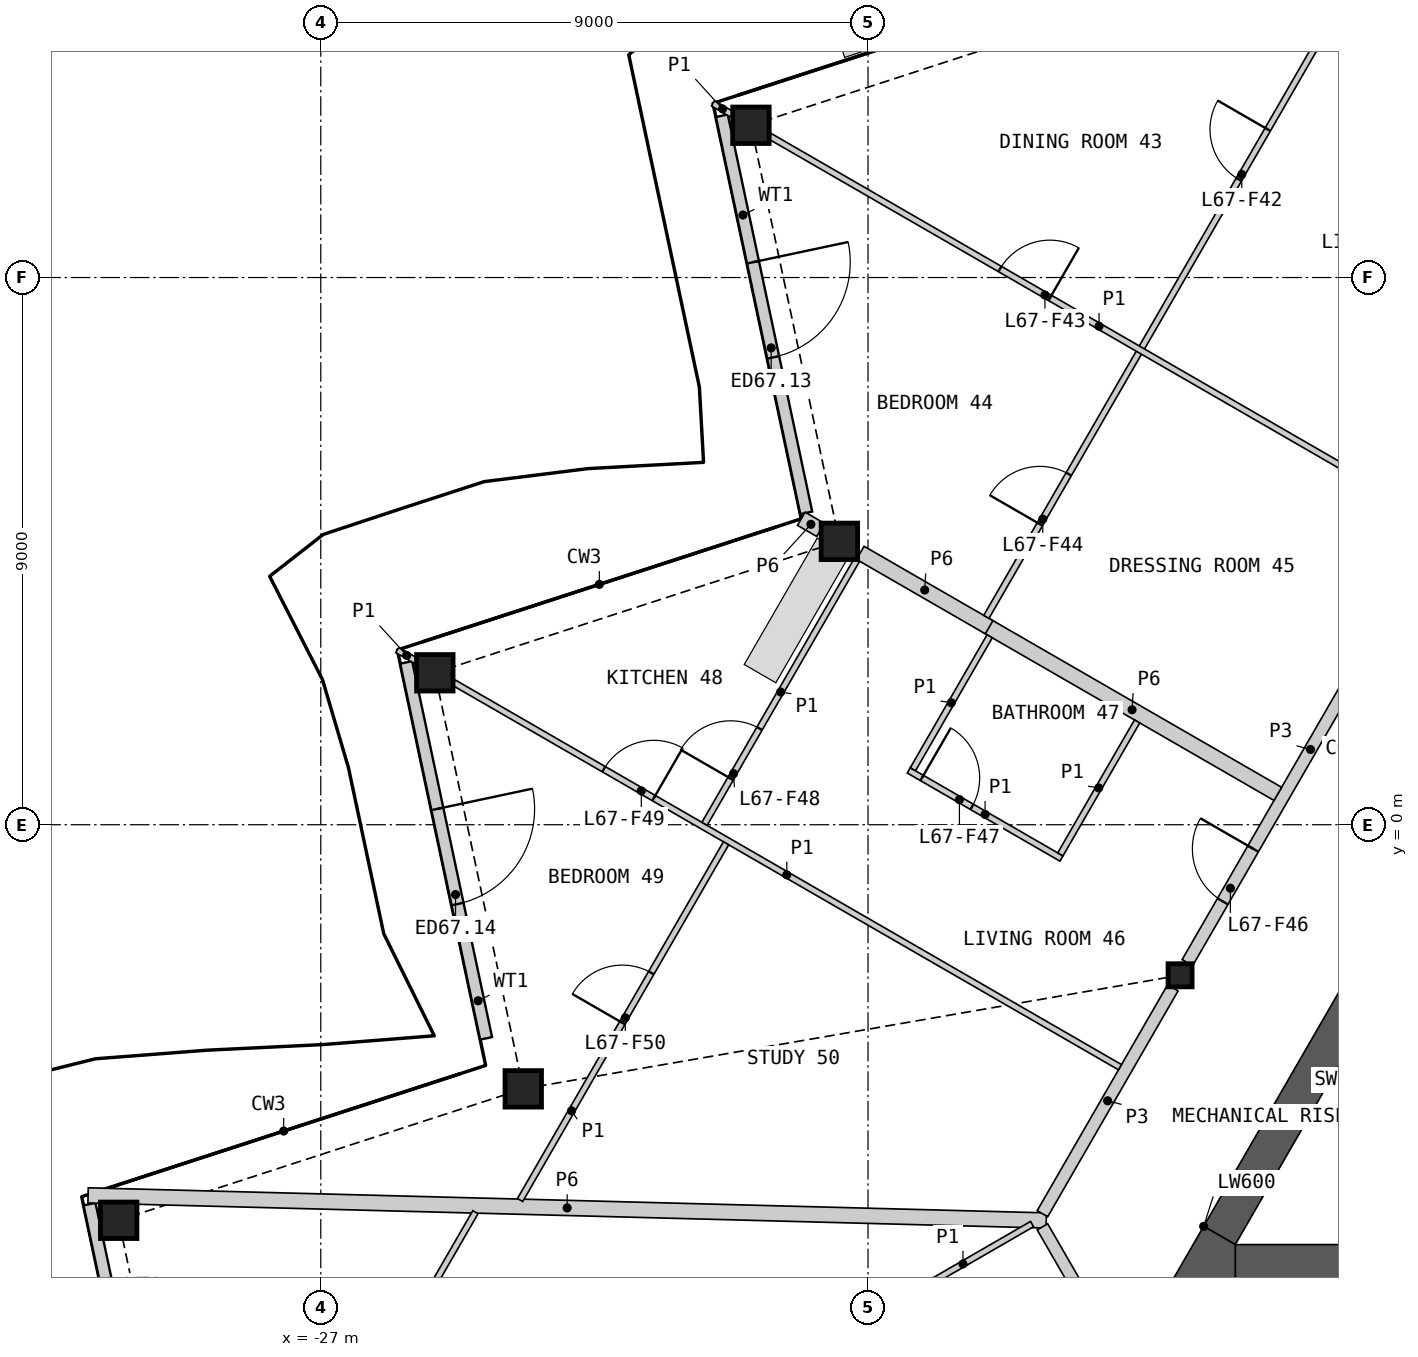
"""IFC4 building model, lengths in metres.
Left out: names, types, materials, properties, quantities, classifications, styles, units other than length and angle.
Written with IfcOpenShell. Run it as: python <this file> out.ifc"""

import sys

from ifc_helpers import new_model, si_unit, direction, frame, frame_2d, origin, origin_2d, place, context, subcontext, project, spatial, polyline, rectangle, hollow_rectangle, i_section, outline, extrude, element, fill, save


model = new_model("IFC4")
c1 = context("Model", 3, precision=1e-05, world=origin(), true_north=direction((0.0, 1.0)))
c2 = subcontext(c1, "Body", "Model", "MODEL_VIEW")
j1 = project(units=[si_unit("LENGTHUNIT", "METRE"), si_unit("PLANEANGLEUNIT", "RADIAN")], contexts=[c1])
p1 = place(None, origin())
s1 = spatial("IfcSite", under=j1, at=p1, CompositionType="ELEMENT")
p2 = place(p1, origin())
s2 = spatial("IfcBuilding", under=s1, at=p2, CompositionType="ELEMENT")
p3 = place(p2, frame((0.0, 0.0, 308.6)))
s3 = spatial("IfcBuildingStorey", under=s2, at=p3, CompositionType="ELEMENT", Elevation=308.6)
for number, where, z_axis, x_axis in (
    (1, (-19.926, 11.504, 0.0), (0.0, 0.0, 1.0), (1.0, 0.0, 0.0)),
    (2, (-18.471, 4.661, 0.0), (0.0, 0.0, 1.0), (1.0, 0.0, 0.0)),
    (3, (-25.125, 2.499, 0.0), (0.0, 0.0, 1.0), (1.0, 0.0, 0.0)),
    (4, (-23.67, -4.344, 0.0), (0.0, 0.0, 1.0), (1.0, 0.0, 0.0)),
    (5, (-30.324, -6.506, 0.0), (0.0, 0.0, 1.0), (1.0, 0.0, 0.0)),
):
    element("IfcColumn", number, at=place(p3, frame(where, z_axis=z_axis, x_axis=x_axis)), inside=s3, PredefinedType="COLUMN", context=c2, shape_type="SweptSolid", body=[
        extrude(hollow_rectangle(XDim=0.6, YDim=0.6, WallThickness=0.04, at=origin_2d()), origin(), (0.0, 0.0, 1.0), 3.4),
    ])
p4 = place(p3, frame((-12.868, -2.476, 0.0), z_axis=(0.0, 0.0, 1.0), x_axis=(1.0, 0.0, 0.0)))
e6 = element("IfcColumn", 6, at=p4, inside=s3, PredefinedType="COLUMN", context=c2, shape_type="SweptSolid", body=[
    extrude(i_section(OverallWidth=0.396, OverallDepth=0.381, WebThickness=0.019, FlangeThickness=0.03, at=origin_2d()), origin(), (0.0, 0.0, 1.0), 3.4),
])
p5 = place(p3, frame((-20.404, 11.661, 0.0), z_axis=(0.0, 0.0, 1.0), x_axis=(0.207893301034, -0.978151509422, 0.0)))
e7 = element("IfcWall", 7, at=p5, inside=s3, PredefinedType="SOLIDWALL", context=c2, shape_type="SweptSolid", body=[
    extrude(rectangle(XDim=6.677, YDim=0.2, at=frame_2d((3.339, 0.0))), origin(), (0.0, 0.0, 1.0), 2.488),
])
p6 = place(p5, frame((2.463, 0.0, 0.0)))
e8 = element("IfcOpeningElement", 8, at=p6, cuts=e7, PredefinedType="OPENING", context=c2, shape_type="SweptSolid", body=[
    extrude(rectangle(XDim=1.6, YDim=2.25, at=frame_2d((0.8, 1.125))), frame((0.0, 0.11, 0.0), z_axis=(0.0, -1.0, 0.0), x_axis=(1.0, 0.0, 0.0)), (0.0, 0.0, 1.0), 0.22),
])
p7 = place(p3, frame((-25.595, 2.67, 0.0), z_axis=(0.0, 0.0, 1.0), x_axis=(0.207888316408, -0.978152568826, 0.0)))
e9 = element("IfcWall", 9, at=p7, inside=s3, PredefinedType="SOLIDWALL", context=c2, shape_type="SweptSolid", body=[
    extrude(rectangle(XDim=6.322, YDim=0.2, at=frame_2d((3.161, 0.0))), origin(), (0.0, 0.0, 1.0), 2.488),
])
p8 = place(p7, frame((2.463, 0.0, 0.0)))
e10 = element("IfcOpeningElement", 10, at=p8, cuts=e9, PredefinedType="OPENING", context=c2, shape_type="SweptSolid", body=[
    extrude(rectangle(XDim=1.6, YDim=2.25, at=frame_2d((0.8, 1.125))), frame((0.0, 0.11, 0.0), z_axis=(0.0, -1.0, 0.0), x_axis=(1.0, 0.0, 0.0)), (0.0, 0.0, 1.0), 0.22),
])
p9 = place(p3, frame((-30.803, -6.241, 0.0), z_axis=(0.0, 0.0, 1.0), x_axis=(0.207917941651, -0.978146272057, 0.0)))
e11 = element("IfcWall", 11, at=p9, inside=s3, PredefinedType="SOLIDWALL", context=c2, shape_type="SweptSolid", body=[
    extrude(rectangle(XDim=6.759, YDim=0.2, at=frame_2d((3.379, 0.0))), origin(), (0.0, 0.0, 1.0), 2.488),
])
p10 = place(p9, frame((2.545, 0.0, 0.0)))
e12 = element("IfcOpeningElement", 12, at=p10, cuts=e11, PredefinedType="OPENING", context=c2, shape_type="SweptSolid", body=[
    extrude(rectangle(XDim=1.6, YDim=2.25, at=frame_2d((0.8, 1.125))), frame((0.0, 0.11, 0.0), z_axis=(0.0, -1.0, 0.0), x_axis=(1.0, 0.0, 0.0)), (0.0, 0.0, 1.0), 0.22),
])
p11 = place(p3, origin())
e13 = element("IfcWall", 13, at=p11, inside=s3, PredefinedType="SHEAR", context=c2, shape_type="SweptSolid", body=[
    extrude(outline(polyline([(-5.307, -1.281), (-10.374, -4.206), (-10.032, -4.298), (-5.182, -1.498), (-5.307, -1.281)])), origin(), (0.0, 0.0, 1.0), 3.1),
])
p12 = place(p3, origin())
e14 = element("IfcWall", 14, at=p12, inside=s3, PredefinedType="SHEAR", context=c2, shape_type="SweptSolid", body=[
    extrude(outline(polyline([(-10.374, -4.206), (-8.83, -6.881), (-8.738, -6.539), (-10.032, -4.298), (-10.374, -4.206)])), origin(), (0.0, 0.0, 1.0), 3.1),
])
p13 = place(p3, frame((-11.961, -7.206, 0.0), z_axis=(0.0, 0.0, 1.0), x_axis=(1.0, 0.0, 0.0)))
e15 = element("IfcWall", 15, at=p13, inside=s3, PredefinedType="SHEAR", context=c2, shape_type="SweptSolid", body=[
    extrude(rectangle(XDim=4.868, YDim=0.6, at=frame_2d((2.434, 0.0))), origin(), (0.0, 0.0, 1.0), 3.1),
])
p14 = place(p3, frame((-9.562, -2.15, 0.0), z_axis=(0.0, 0.0, 1.0), x_axis=(-0.500015214976, -0.866016619236, 0.0)))
e16 = element("IfcWall", 16, at=p14, inside=s3, PredefinedType="SHEAR", context=c2, shape_type="SweptSolid", body=[
    extrude(rectangle(XDim=5.318, YDim=0.6, at=frame_2d((2.659, 0.0))), origin(), (0.0, 0.0, 1.0), 3.1),
])
p15 = place(p3, origin())
e17 = element("IfcWall", 17, at=p15, inside=s3, PredefinedType="SHEAR", context=c2, shape_type="SweptSolid", body=[
    extrude(outline(polyline([(-12.48, -6.606), (-11.961, -6.906), (-11.961, -7.506), (-13.0, -7.506), (-12.48, -6.606)])), origin(), (0.0, 0.0, 1.0), 3.1),
])
p16 = place(p3, frame((-30.827, -6.096, 0.0), z_axis=(0.0, 0.0, 1.0), x_axis=(0.999657799118, -0.026158835273, 0.0)))
e18 = element("IfcWall", 18, at=p16, inside=s3, PredefinedType="PARTITIONING", context=c2, shape_type="SweptSolid", body=[
    extrude(rectangle(XDim=15.763, YDim=0.25, at=frame_2d((7.882, 0.0))), origin(), (0.0, 0.0, 1.0), 2.33),
])
p17 = place(p3, frame((-12.748, -2.269, 0.0), z_axis=(0.0, 0.0, 1.0), x_axis=(0.499984266882, 0.866034487114, 0.0)))
e19 = element("IfcWall", 19, at=p17, inside=s3, PredefinedType="PARTITIONING", context=c2, shape_type="SweptSolid", body=[
    extrude(rectangle(XDim=8.099, YDim=0.2, at=frame_2d((4.049, 0.0))), origin(), (0.0, 0.0, 1.0), 3.1),
])
p18 = place(p17, frame((1.164, 0.0, 0.0)))
e20 = element("IfcOpeningElement", 20, at=p18, cuts=e19, PredefinedType="OPENING", context=c2, shape_type="SweptSolid", body=[
    extrude(rectangle(XDim=1.0, YDim=2.1, at=frame_2d((0.5, 1.05))), frame((0.0, 0.11, 0.0), z_axis=(0.0, -1.0, 0.0), x_axis=(1.0, 0.0, 0.0)), (0.0, 0.0, 1.0), 0.22),
])
p19 = place(p3, frame((-16.054, 3.275, 0.0), z_axis=(0.0, 0.0, 1.0), x_axis=(0.866019581949, -0.500010083578, 0.0)))
e21 = element("IfcWall", 21, at=p19, inside=s3, PredefinedType="PARTITIONING", context=c2, shape_type="SweptSolid", body=[
    extrude(rectangle(XDim=5.535, YDim=0.25, at=frame_2d((2.768, 0.0))), origin(), (0.0, 0.0, 1.0), 2.33),
])
p20 = place(p3, frame((-15.131, -6.397, 0.0), z_axis=(0.0, 0.0, 1.0), x_axis=(0.500003406062, 0.866023437285, 0.0)))
e22 = element("IfcWall", 22, at=p20, inside=s3, PredefinedType="PARTITIONING", context=c2, shape_type="SweptSolid", body=[
    extrude(rectangle(XDim=4.288, YDim=0.2, at=frame_2d((2.144, 0.0))), origin(), (0.0, 0.0, 1.0), 3.1),
])
p21 = place(p3, frame((-15.131, -6.614, 0.0), z_axis=(0.0, 0.0, 1.0), x_axis=(0.499967746641, -0.866044024469, 0.0)))
e23 = element("IfcWall", 23, at=p21, inside=s3, PredefinedType="PARTITIONING", context=c2, shape_type="SweptSolid", body=[
    extrude(rectangle(XDim=3.676, YDim=0.2, at=frame_2d((1.838, 0.0))), origin(), (0.0, 0.0, 1.0), 3.1),
])
p22 = place(p21, frame((2.426, 0.0, 0.0)))
e24 = element("IfcOpeningElement", 24, at=p22, cuts=e23, PredefinedType="OPENING", context=c2, shape_type="SweptSolid", body=[
    extrude(rectangle(XDim=1.0, YDim=2.1, at=frame_2d((0.5, 1.05))), frame((0.0, 0.11, 0.0), z_axis=(0.0, -1.0, 0.0), x_axis=(1.0, 0.0, 0.0)), (0.0, 0.0, 1.0), 0.22),
])
p23 = place(p3, frame((-18.127, 4.472, 0.0), z_axis=(0.0, 0.0, 1.0), x_axis=(0.866017755388, -0.500013247177, 0.0)))
e25 = element("IfcWall", 25, at=p23, inside=s3, PredefinedType="PARTITIONING", context=c2, shape_type="SweptSolid", body=[
    extrude(rectangle(XDim=2.447, YDim=0.25, at=frame_2d((1.223, 0.0))), origin(), (0.0, 0.0, 1.0), 2.33),
])
p24 = place(p3, frame((-19.097, 5.032, 0.0), z_axis=(0.0, 0.0, 1.0), x_axis=(0.86609656662, -0.499876722092, 0.0)))
e26 = element("IfcWall", 26, at=p24, inside=s3, PredefinedType="PARTITIONING", context=c2, shape_type="SweptSolid", body=[
    extrude(rectangle(XDim=0.365, YDim=0.25, at=frame_2d((0.183, 0.0))), origin(), (0.0, 0.0, 1.0), 2.33),
])
p25 = place(p3, frame((-16.054, 3.419, 0.0), z_axis=(0.0, 0.0, 1.0), x_axis=(0.499999256795, 0.866025832873, 0.0)))
e27 = element("IfcWall", 27, at=p25, inside=s3, PredefinedType="PARTITIONING", context=c2, shape_type="SweptSolid", body=[
    extrude(rectangle(XDim=15.448, YDim=0.1, at=frame_2d((7.724, 0.0))), origin(), (0.0, 0.0, 1.0), 2.33),
])
p26 = place(p25, frame((8.306, 0.0, 0.0)))
e28 = element("IfcOpeningElement", 28, at=p26, cuts=e27, PredefinedType="OPENING", context=c2, shape_type="SweptSolid", body=[
    extrude(rectangle(XDim=0.95, YDim=2.1, at=frame_2d((0.475, 1.05))), frame((0.0, 0.06, 0.0), z_axis=(0.0, -1.0, 0.0), x_axis=(1.0, 0.0, 0.0)), (0.0, 0.0, 1.0), 0.12),
])
p27 = place(p25, frame((1.76, 0.0, 0.0)))
e29 = element("IfcOpeningElement", 29, at=p27, cuts=e27, PredefinedType="OPENING", context=c2, shape_type="SweptSolid", body=[
    extrude(rectangle(XDim=0.95, YDim=2.1, at=frame_2d((0.475, 1.05))), frame((0.0, 0.06, 0.0), z_axis=(0.0, -1.0, 0.0), x_axis=(1.0, 0.0, 0.0)), (0.0, 0.0, 1.0), 0.12),
])
p28 = place(p3, frame((-24.815, 2.339, 0.0), z_axis=(0.0, 0.0, 1.0), x_axis=(0.866021406514, -0.500006923412, 0.0)))
e30 = element("IfcWall", 30, at=p28, inside=s3, PredefinedType="PARTITIONING", context=c2, shape_type="SweptSolid", body=[
    extrude(rectangle(XDim=12.654, YDim=0.1, at=frame_2d((6.327, 0.0))), origin(), (0.0, 0.0, 1.0), 2.33),
])
p29 = place(p28, frame((2.851, 0.0, 0.0)))
e31 = element("IfcOpeningElement", 31, at=p29, cuts=e30, PredefinedType="OPENING", context=c2, shape_type="SweptSolid", body=[
    extrude(rectangle(XDim=0.95, YDim=2.1, at=frame_2d((0.475, 1.05))), frame((0.0, 0.06, 0.0), z_axis=(0.0, -1.0, 0.0), x_axis=(1.0, 0.0, 0.0)), (0.0, 0.0, 1.0), 0.12),
])
p30 = place(p3, frame((-19.615, 11.325, 0.0), z_axis=(0.0, 0.0, 1.0), x_axis=(0.86602139559, -0.500006942333, 0.0)))
e32 = element("IfcWall", 32, at=p30, inside=s3, PredefinedType="PARTITIONING", context=c2, shape_type="SweptSolid", body=[
    extrude(rectangle(XDim=12.505, YDim=0.1, at=frame_2d((6.252, 0.0))), origin(), (0.0, 0.0, 1.0), 2.33),
])
p31 = place(p30, frame((4.37, 0.0, 0.0)))
e33 = element("IfcOpeningElement", 33, at=p31, cuts=e32, PredefinedType="OPENING", context=c2, shape_type="SweptSolid", body=[
    extrude(rectangle(XDim=0.95, YDim=2.1, at=frame_2d((0.475, 1.05))), frame((0.0, 0.06, 0.0), z_axis=(0.0, -1.0, 0.0), x_axis=(1.0, 0.0, 0.0)), (0.0, 0.0, 1.0), 0.12),
])
p32 = place(p3, frame((-23.722, -6.172, 0.0), z_axis=(0.0, 0.0, 1.0), x_axis=(0.499991774685, 0.86603015262, 0.0)))
e34 = element("IfcWall", 34, at=p32, inside=s3, PredefinedType="PARTITIONING", context=c2, shape_type="SweptSolid", body=[
    extrude(rectangle(XDim=6.774, YDim=0.1, at=frame_2d((3.387, 0.0))), origin(), (0.0, 0.0, 1.0), 2.33),
])
p33 = place(p32, frame((3.364, 0.0, 0.0)))
e35 = element("IfcOpeningElement", 35, at=p33, cuts=e34, PredefinedType="OPENING", context=c2, shape_type="SweptSolid", body=[
    extrude(rectangle(XDim=0.95, YDim=2.1, at=frame_2d((0.475, 1.05))), frame((0.0, 0.06, 0.0), z_axis=(0.0, -1.0, 0.0), x_axis=(1.0, 0.0, 0.0)), (0.0, 0.0, 1.0), 0.12),
])
p34 = place(p3, frame((-20.689, 0.014, 0.0), z_axis=(0.0, 0.0, 1.0), x_axis=(0.500003822013, 0.866023197133, 0.0)))
e36 = element("IfcWall", 36, at=p34, inside=s3, PredefinedType="PARTITIONING", context=c2, shape_type="SweptSolid", body=[
    extrude(rectangle(XDim=5.007, YDim=0.1, at=frame_2d((2.504, 0.0))), origin(), (0.0, 0.0, 1.0), 2.33),
])
p35 = place(p34, frame((0.86, 0.0, 0.0)))
e37 = element("IfcOpeningElement", 37, at=p35, cuts=e36, PredefinedType="OPENING", context=c2, shape_type="SweptSolid", body=[
    extrude(rectangle(XDim=0.95, YDim=2.1, at=frame_2d((0.475, 1.05))), frame((0.0, 0.06, 0.0), z_axis=(0.0, -1.0, 0.0), x_axis=(1.0, 0.0, 0.0)), (0.0, 0.0, 1.0), 0.12),
])
p36 = place(p3, frame((-26.788, -10.41, 0.0), z_axis=(0.0, 0.0, 1.0), x_axis=(0.499997484116, 0.866026856326, 0.0)))
e38 = element("IfcWall", 38, at=p36, inside=s3, PredefinedType="PARTITIONING", context=c2, shape_type="SweptSolid", body=[
    extrude(rectangle(XDim=4.662, YDim=0.1, at=frame_2d((2.331, 0.0))), origin(), (0.0, 0.0, 1.0), 2.33),
])
p37 = place(p36, frame((0.752, 0.0, 0.0)))
e39 = element("IfcOpeningElement", 39, at=p37, cuts=e38, PredefinedType="OPENING", context=c2, shape_type="SweptSolid", body=[
    extrude(rectangle(XDim=0.95, YDim=2.1, at=frame_2d((0.475, 1.05))), frame((0.0, 0.06, 0.0), z_axis=(0.0, -1.0, 0.0), x_axis=(1.0, 0.0, 0.0)), (0.0, 0.0, 1.0), 0.12),
])
p38 = place(p3, frame((-17.33, 0.894, 0.0), z_axis=(0.0, 0.0, 1.0), x_axis=(0.866032775405, -0.499987231761, 0.0)))
e40 = element("IfcWall", 40, at=p38, inside=s3, PredefinedType="PARTITIONING", context=c2, shape_type="SweptSolid", body=[
    extrude(rectangle(XDim=2.9, YDim=0.1, at=frame_2d((1.45, 0.0))), origin(), (0.0, 0.0, 1.0), 2.33),
])
p39 = place(p38, frame((0.25, 0.0, 0.0)))
e41 = element("IfcOpeningElement", 41, at=p39, cuts=e40, PredefinedType="OPENING", context=c2, shape_type="SweptSolid", body=[
    extrude(rectangle(XDim=0.95, YDim=2.1, at=frame_2d((0.475, 1.05))), frame((0.0, 0.06, 0.0), z_axis=(0.0, -1.0, 0.0), x_axis=(1.0, 0.0, 0.0)), (0.0, 0.0, 1.0), 0.12),
])
p40 = place(p3, frame((-14.837, -0.488, 0.0), z_axis=(0.0, 0.0, 1.0), x_axis=(0.499976333282, 0.866039067339, 0.0)))
e42 = element("IfcWall", 42, at=p40, inside=s3, PredefinedType="PARTITIONING", context=c2, shape_type="SweptSolid", body=[
    extrude(rectangle(XDim=2.525, YDim=0.1, at=frame_2d((1.262, 0.0))), origin(), (0.0, 0.0, 1.0), 2.33),
])
p41 = place(p3, frame((-17.262, 0.912, 0.0), z_axis=(0.0, 0.0, 1.0), x_axis=(0.500048846702, 0.865997200291, 0.0)))
e43 = element("IfcWall", 43, at=p41, inside=s3, PredefinedType="PARTITIONING", context=c2, shape_type="SweptSolid", body=[
    extrude(rectangle(XDim=2.525, YDim=0.1, at=frame_2d((1.263, 0.0))), origin(), (0.0, 0.0, 1.0), 2.33),
])
p42 = place(p3, frame((-17.575, -7.881, 0.0), z_axis=(0.0, 0.0, 1.0), x_axis=(0.866013657776, 0.500020344131, 0.0)))
e44 = element("IfcWall", 44, at=p42, inside=s3, PredefinedType="PARTITIONING", context=c2, shape_type="SweptSolid", body=[
    extrude(rectangle(XDim=2.625, YDim=0.1, at=frame_2d((1.312, 0.0))), origin(), (0.0, 0.0, 1.0), 2.33),
])
p43 = place(p3, frame((-20.55, 11.865, 0.0), z_axis=(0.0, 0.0, 1.0), x_axis=(0.866039913117, -0.499974868256, 0.0)))
e45 = element("IfcWall", 45, at=p43, inside=s3, PredefinedType="PARTITIONING", context=c2, shape_type="SweptSolid", body=[
    extrude(rectangle(XDim=0.363, YDim=0.1, at=frame_2d((0.181, 0.0))), origin(), (0.0, 0.0, 1.0), 2.33),
])
p44 = place(p3, frame((-25.741, 2.874, 0.0), z_axis=(0.0, 0.0, 1.0), x_axis=(0.865851769275, -0.500300623268, 0.0)))
e46 = element("IfcWall", 46, at=p44, inside=s3, PredefinedType="PARTITIONING", context=c2, shape_type="SweptSolid", body=[
    extrude(rectangle(XDim=0.353, YDim=0.1, at=frame_2d((0.177, 0.0))), origin(), (0.0, 0.0, 1.0), 2.33),
])
p45 = place(p6, origin())
e47 = element("IfcDoor", 47, at=p45, inside=s3, OperationType="DOUBLE_DOOR_SINGLE_SWING", PredefinedType="DOOR", context=c2, shape_type="SweptSolid", body=[
    extrude(rectangle(XDim=1.6, YDim=2.25, at=frame_2d((0.8, 1.125))), frame((0.0, 0.025, 0.0), z_axis=(0.0, -1.0, 0.0), x_axis=(1.0, 0.0, 0.0)), (0.0, 0.0, 1.0), 0.05),
])
fill(e8, e47)
p46 = place(p8, origin())
e48 = element("IfcDoor", 48, at=p46, inside=s3, OperationType="DOUBLE_DOOR_SINGLE_SWING", PredefinedType="DOOR", context=c2, shape_type="SweptSolid", body=[
    extrude(rectangle(XDim=1.6, YDim=2.25, at=frame_2d((0.8, 1.125))), frame((0.0, 0.025, 0.0), z_axis=(0.0, -1.0, 0.0), x_axis=(1.0, 0.0, 0.0)), (0.0, 0.0, 1.0), 0.05),
])
fill(e10, e48)
p47 = place(p26, origin())
e49 = element("IfcDoor", 49, at=p47, inside=s3, OperationType="SINGLE_SWING_RIGHT", PredefinedType="DOOR", context=c2, shape_type="SweptSolid", body=[
    extrude(rectangle(XDim=0.95, YDim=2.1, at=frame_2d((0.475, 1.05))), frame((0.0, 0.025, 0.0), z_axis=(0.0, -1.0, 0.0), x_axis=(1.0, 0.0, 0.0)), (0.0, 0.0, 1.0), 0.05),
])
fill(e28, e49)
p48 = place(p31, origin())
e50 = element("IfcDoor", 50, at=p48, inside=s3, OperationType="SINGLE_SWING_RIGHT", PredefinedType="DOOR", context=c2, shape_type="SweptSolid", body=[
    extrude(rectangle(XDim=0.95, YDim=2.1, at=frame_2d((0.475, 1.05))), frame((0.0, 0.025, 0.0), z_axis=(0.0, -1.0, 0.0), x_axis=(1.0, 0.0, 0.0)), (0.0, 0.0, 1.0), 0.05),
])
fill(e33, e50)
p49 = place(p27, origin())
e51 = element("IfcDoor", 51, at=p49, inside=s3, OperationType="SINGLE_SWING_LEFT", PredefinedType="DOOR", context=c2, shape_type="SweptSolid", body=[
    extrude(rectangle(XDim=0.95, YDim=2.1, at=frame_2d((0.475, 1.05))), frame((0.0, 0.025, 0.0), z_axis=(0.0, -1.0, 0.0), x_axis=(1.0, 0.0, 0.0)), (0.0, 0.0, 1.0), 0.05),
])
fill(e29, e51)
p50 = place(p18, origin())
e52 = element("IfcDoor", 52, at=p50, inside=s3, OperationType="SINGLE_SWING_RIGHT", PredefinedType="DOOR", context=c2, shape_type="SweptSolid", body=[
    extrude(rectangle(XDim=1.0, YDim=2.1, at=frame_2d((0.5, 1.05))), frame((0.0, 0.025, 0.0), z_axis=(0.0, -1.0, 0.0), x_axis=(1.0, 0.0, 0.0)), (0.0, 0.0, 1.0), 0.05),
])
fill(e20, e52)
p51 = place(p39, origin())
e53 = element("IfcDoor", 53, at=p51, inside=s3, OperationType="SINGLE_SWING_LEFT", PredefinedType="DOOR", context=c2, shape_type="SweptSolid", body=[
    extrude(rectangle(XDim=0.95, YDim=2.1, at=frame_2d((0.475, 1.05))), frame((0.0, 0.025, 0.0), z_axis=(0.0, -1.0, 0.0), x_axis=(1.0, 0.0, 0.0)), (0.0, 0.0, 1.0), 0.05),
])
fill(e41, e53)
p52 = place(p35, origin())
e54 = element("IfcDoor", 54, at=p52, inside=s3, OperationType="SINGLE_SWING_LEFT", PredefinedType="DOOR", context=c2, shape_type="SweptSolid", body=[
    extrude(rectangle(XDim=0.95, YDim=2.1, at=frame_2d((0.475, 1.05))), frame((0.0, 0.025, 0.0), z_axis=(0.0, -1.0, 0.0), x_axis=(1.0, 0.0, 0.0)), (0.0, 0.0, 1.0), 0.05),
])
fill(e37, e54)
p53 = place(p29, origin())
e55 = element("IfcDoor", 55, at=p53, inside=s3, OperationType="SINGLE_SWING_RIGHT", PredefinedType="DOOR", context=c2, shape_type="SweptSolid", body=[
    extrude(rectangle(XDim=0.95, YDim=2.1, at=frame_2d((0.475, 1.05))), frame((0.0, 0.025, 0.0), z_axis=(0.0, -1.0, 0.0), x_axis=(1.0, 0.0, 0.0)), (0.0, 0.0, 1.0), 0.05),
])
fill(e31, e55)
p54 = place(p33, origin())
e56 = element("IfcDoor", 56, at=p54, inside=s3, OperationType="SINGLE_SWING_LEFT", PredefinedType="DOOR", context=c2, shape_type="SweptSolid", body=[
    extrude(rectangle(XDim=0.95, YDim=2.1, at=frame_2d((0.475, 1.05))), frame((0.0, 0.025, 0.0), z_axis=(0.0, -1.0, 0.0), x_axis=(1.0, 0.0, 0.0)), (0.0, 0.0, 1.0), 0.05),
])
fill(e35, e56)
save(model, sys.argv[1])
